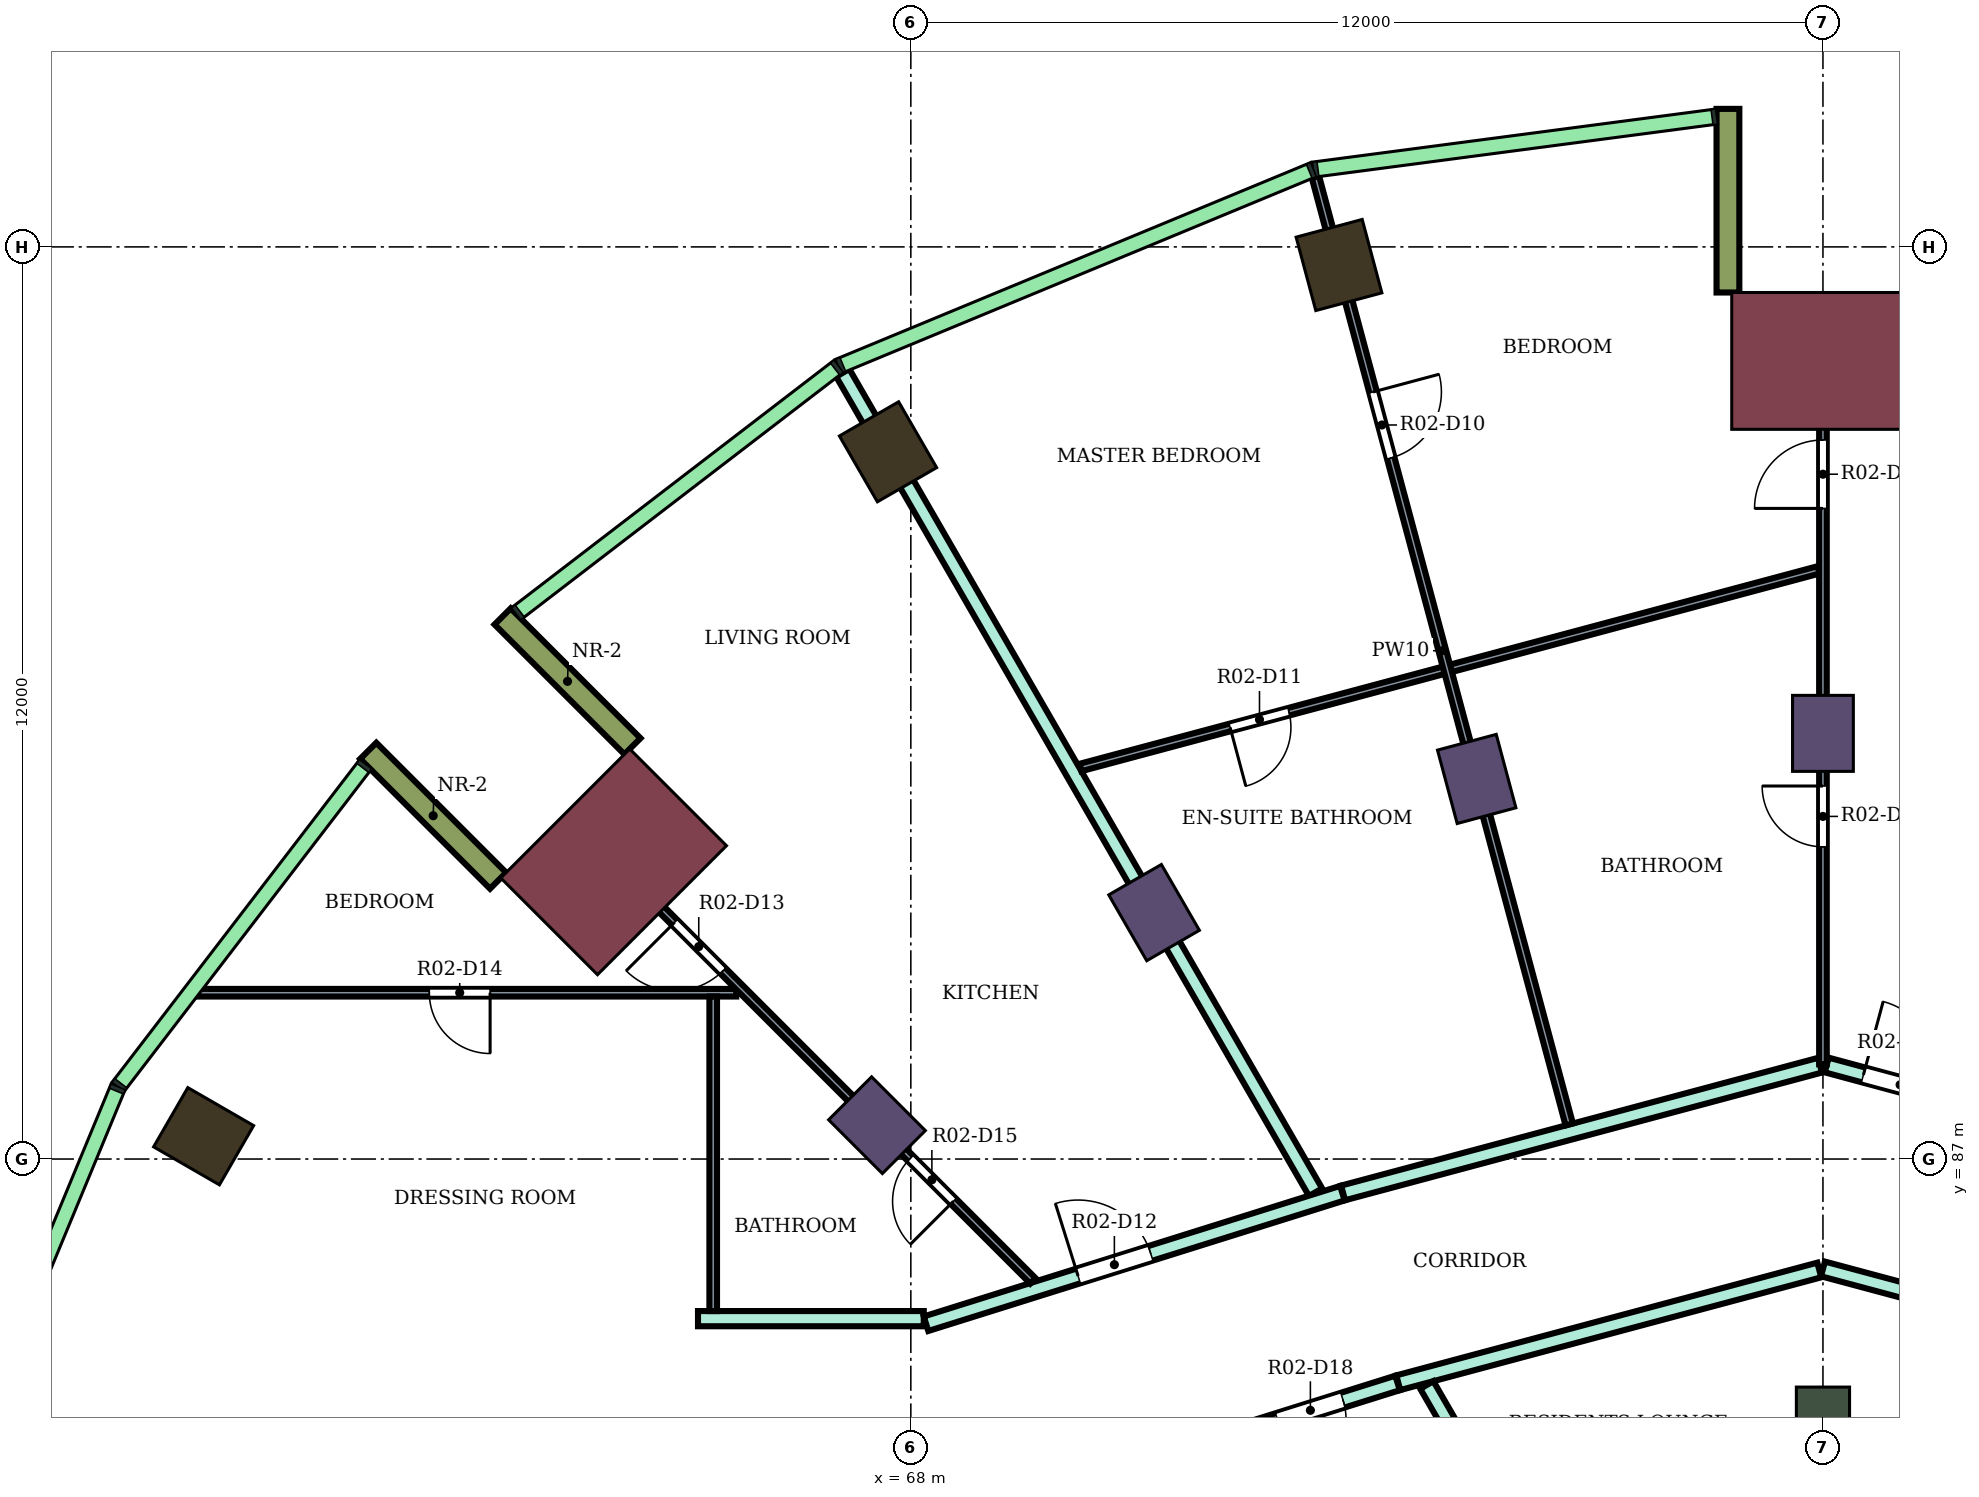
"""IFC4 building model, lengths in metres.
Left out: names, types, materials, properties, quantities, classifications, styles, units other than length and angle.
Written with IfcOpenShell. Run it as: python <this file> out.ifc"""

import sys

from ifc_helpers import new_model, si_unit, direction, frame, frame_2d, origin, origin_2d, place, context, subcontext, project, spatial, rectangle, extrude, element, fill, save


model = new_model("IFC4")
c1 = context("Model", 3, precision=1e-05, world=origin(), true_north=direction((0.0, 1.0)))
c2 = subcontext(c1, "Body", "Model", "MODEL_VIEW")
j1 = project(units=[si_unit("LENGTHUNIT", "METRE"), si_unit("PLANEANGLEUNIT", "RADIAN")], contexts=[c1])
p1 = place(None, origin())
s1 = spatial("IfcSite", under=j1, at=p1, CompositionType="ELEMENT")
p2 = place(p1, origin())
s2 = spatial("IfcBuilding", under=s1, at=p2, CompositionType="ELEMENT")
p3 = place(p2, frame((0.0, 0.0, 178.2)))
s3 = spatial("IfcBuildingStorey", under=s2, at=p3, CompositionType="ELEMENT", Elevation=178.2)
for number, where, z_axis, x_axis in (
    (1, (73.633, 98.762, 0.0), (0.0, 0.0, 1.0), (-0.259, 0.966, 0.0)),
    (2, (67.7, 96.304, 0.0), (0.0, 0.0, 1.0), (-0.5, 0.866, 0.0)),
    (3, (58.696, 87.3, 0.0), (0.0, 0.0, 1.0), (-0.866, 0.5, 0.0)),
):
    element("IfcColumn", number, at=place(p3, frame(where, z_axis=z_axis, x_axis=x_axis)), inside=s3, PredefinedType="COLUMN", context=c2, shape_type="SweptSolid", body=[
        extrude(rectangle(XDim=1.0, YDim=0.9, at=origin_2d()), origin(), (0.0, 0.0, 1.0), 4.1),
    ])
for number, where, z_axis, x_axis in (
    (4, (80.0, 92.6, 0.0), (0.0, 0.0, 1.0), (0.0, 1.0, 0.0)),
    (5, (75.445, 92.0, 0.0), (0.0, 0.0, 1.0), (-0.259, 0.966, 0.0)),
    (6, (71.2, 90.242, 0.0), (0.0, 0.0, 1.0), (-0.5, 0.866, 0.0)),
    (7, (67.555, 87.445, 0.0), (0.0, 0.0, 1.0), (-0.707, 0.707, 0.0)),
):
    element("IfcColumn", number, at=place(p3, frame(where, z_axis=z_axis, x_axis=x_axis)), inside=s3, PredefinedType="COLUMN", context=c2, shape_type="SweptSolid", body=[
        extrude(rectangle(XDim=1.0, YDim=0.8, at=origin_2d()), origin(), (0.0, 0.0, 1.0), 4.1),
    ])
p4 = place(p3, frame((80.0, 83.6, 0.0), z_axis=(0.0, 0.0, 1.0), x_axis=(0.0, 1.0, 0.0)))
e8 = element("IfcColumn", 8, at=p4, inside=s3, PredefinedType="COLUMN", context=c2, shape_type="SweptSolid", body=[
    extrude(rectangle(XDim=0.8, YDim=0.7, at=origin_2d()), origin(), (0.0, 0.0, 1.0), 4.1),
])
for number, where, z_axis, x_axis in (
    (9, (80.0, 97.5, 0.0), (0.0, 0.0, 1.0), (0.0, 1.0, 0.0)),
    (10, (64.09, 90.91, 0.0), (0.0, 0.0, 1.0), (-0.707, 0.707, 0.0)),
):
    element("IfcColumn", number, at=place(p3, frame(where, z_axis=z_axis, x_axis=x_axis)), inside=s3, PredefinedType="COLUMN", context=c2, shape_type="SweptSolid", body=[
        extrude(rectangle(XDim=1.8, YDim=2.4, at=origin_2d()), origin(), (0.0, 0.0, 1.0), 4.1),
    ])
for number, where, z_axis, x_axis in (
    (11, (78.75, 98.4, 0.0), (0.0, 0.0, 1.0), (0.0, 1.0, 0.0)),
    (12, (64.338, 92.43, 0.0), (0.0, 0.0, 1.0), (-0.707, 0.707, 0.0)),
    (13, (62.57, 90.662, 0.0), (0.0, 0.0, 1.0), (-0.707, 0.707, 0.0)),
):
    element("IfcWall", number, at=place(p3, frame(where, z_axis=z_axis, x_axis=x_axis)), inside=s3, PredefinedType="NOTDEFINED", context=c2, shape_type="SweptSolid", body=[
        extrude(rectangle(XDim=2.416, YDim=0.3, at=frame_2d((1.208, 0.0))), origin(), (0.0, 0.0, 1.0), 4.1),
    ])
p5 = place(p3, frame((65.2, 84.9, 0.0), z_axis=(0.0, 0.0, 1.0), x_axis=(1.0, 0.0, 0.0)))
e14 = element("IfcWall", 14, at=p5, inside=s3, PredefinedType="PARTITIONING", context=c2, shape_type="SweptSolid", body=[
    extrude(rectangle(XDim=2.97, YDim=0.2, at=frame_2d((1.485, 0.0))), origin(), (0.0, 0.0, 1.0), 3.65),
])
p6 = place(p3, frame((67.104, 97.343, 0.0), z_axis=(0.0, 0.0, 1.0), x_axis=(0.499841888023, -0.866116670534, 0.0)))
e15 = element("IfcWall", 15, at=p6, inside=s3, PredefinedType="PARTITIONING", context=c2, shape_type="SweptSolid", body=[
    extrude(rectangle(XDim=12.446, YDim=0.2, at=frame_2d((6.223, 0.0))), origin(), (0.0, 0.0, 1.0), 3.65),
])
p7 = place(p3, frame((68.2, 84.833, 0.0), z_axis=(0.0, 0.0, 1.0), x_axis=(0.954191968402, 0.299195065863, 0.0)))
e16 = element("IfcWall", 16, at=p7, inside=s3, PredefinedType="PARTITIONING", context=c2, shape_type="SweptSolid", body=[
    extrude(rectangle(XDim=5.74, YDim=0.2, at=frame_2d((2.87, 0.0))), origin(), (0.0, 0.0, 1.0), 3.65),
])
p8 = place(p7, frame((2.097, 0.0, 0.0)))
e17 = element("IfcOpeningElement", 17, at=p8, cuts=e16, PredefinedType="OPENING", context=c2, shape_type="SweptSolid", body=[
    extrude(rectangle(XDim=1.0, YDim=2.1, at=frame_2d((0.5, 1.05))), frame((0.0, 0.11, 0.0), z_axis=(0.0, -1.0, 0.0), x_axis=(1.0, 0.0, 0.0)), (0.0, 0.0, 1.0), 0.22),
])
p9 = place(p3, frame((72.1, 83.332, 0.0), z_axis=(0.0, 0.0, 1.0), x_axis=(0.954233106619, 0.299063836383, 0.0)))
e18 = element("IfcWall", 18, at=p9, inside=s3, PredefinedType="PARTITIONING", context=c2, shape_type="SweptSolid", body=[
    extrude(rectangle(XDim=2.414, YDim=0.2, at=frame_2d((1.207, 0.0))), origin(), (0.0, 0.0, 1.0), 3.65),
])
p10 = place(p9, frame((0.762, 0.0, 0.0)))
e19 = element("IfcOpeningElement", 19, at=p10, cuts=e18, PredefinedType="OPENING", context=c2, shape_type="SweptSolid", body=[
    extrude(rectangle(XDim=0.9, YDim=2.1, at=frame_2d((0.45, 1.05))), frame((0.0, 0.11, 0.0), z_axis=(0.0, -1.0, 0.0), x_axis=(1.0, 0.0, 0.0)), (0.0, 0.0, 1.0), 0.22),
])
p11 = place(p3, frame((73.687, 86.554, 0.0), z_axis=(0.0, 0.0, 1.0), x_axis=(0.96595928904, 0.258694128106, 0.0)))
e20 = element("IfcWall", 20, at=p11, inside=s3, PredefinedType="PARTITIONING", context=c2, shape_type="SweptSolid", body=[
    extrude(rectangle(XDim=6.496, YDim=0.2, at=frame_2d((3.248, 0.0))), origin(), (0.0, 0.0, 1.0), 3.65),
])
p12 = place(p3, frame((74.413, 84.057, 0.0), z_axis=(0.0, 0.0, 1.0), x_axis=(0.965970849692, 0.258650956976, 0.0)))
e21 = element("IfcWall", 21, at=p12, inside=s3, PredefinedType="PARTITIONING", context=c2, shape_type="SweptSolid", body=[
    extrude(rectangle(XDim=5.734, YDim=0.2, at=frame_2d((2.867, 0.0))), origin(), (0.0, 0.0, 1.0), 3.65),
])
p13 = place(p3, frame((74.788, 84.028, 0.0), z_axis=(0.0, 0.0, 1.0), x_axis=(0.499859501914, -0.866106505198, 0.0)))
e22 = element("IfcWall", 22, at=p13, inside=s3, PredefinedType="PARTITIONING", context=c2, shape_type="SweptSolid", body=[
    extrude(rectangle(XDim=2.724, YDim=0.2, at=frame_2d((1.362, 0.0))), origin(), (0.0, 0.0, 1.0), 3.65),
])
p14 = place(p3, frame((80.0, 85.554, 0.0), z_axis=(0.0, 0.0, 1.0), x_axis=(0.965894438951, -0.258936155845, 0.0)))
e23 = element("IfcWall", 23, at=p14, inside=s3, PredefinedType="PARTITIONING", context=c2, shape_type="SweptSolid", body=[
    extrude(rectangle(XDim=5.774, YDim=0.2, at=frame_2d((2.887, 0.0))), origin(), (0.0, 0.0, 1.0), 3.65),
])
p15 = place(p14, frame((1.841, 0.0, 0.0)))
e24 = element("IfcOpeningElement", 24, at=p15, cuts=e23, PredefinedType="OPENING", context=c2, shape_type="SweptSolid", body=[
    extrude(rectangle(XDim=1.8, YDim=2.1, at=frame_2d((0.9, 1.05))), frame((0.0, 0.11, 0.0), z_axis=(0.0, -1.0, 0.0), x_axis=(1.0, 0.0, 0.0)), (0.0, 0.0, 1.0), 0.22),
])
p16 = place(p3, frame((80.049, 88.237, 0.0), z_axis=(0.0, 0.0, 1.0), x_axis=(0.965582990495, -0.260095152718, 0.0)))
e25 = element("IfcWall", 25, at=p16, inside=s3, PredefinedType="PARTITIONING", context=c2, shape_type="SweptSolid", body=[
    extrude(rectangle(XDim=6.476, YDim=0.2, at=frame_2d((3.238, 0.0))), origin(), (0.0, 0.0, 1.0), 3.65),
])
p17 = place(p16, frame((0.5, 0.0, 0.0)))
e26 = element("IfcOpeningElement", 26, at=p17, cuts=e25, PredefinedType="OPENING", context=c2, shape_type="SweptSolid", body=[
    extrude(rectangle(XDim=1.0, YDim=2.1, at=frame_2d((0.5, 1.05))), frame((0.0, 0.11, 0.0), z_axis=(0.0, -1.0, 0.0), x_axis=(1.0, 0.0, 0.0)), (0.0, 0.0, 1.0), 0.22),
])
p18 = place(p3, frame((58.6, 89.188, 0.0), z_axis=(0.0, 0.0, 1.0), x_axis=(1.0, 0.0, 0.0)))
e27 = element("IfcWall", 27, at=p18, inside=s3, PredefinedType="PARTITIONING", context=c2, shape_type="SweptSolid", body=[
    extrude(rectangle(XDim=7.103, YDim=0.1, at=frame_2d((3.551, 0.0))), origin(), (0.0, 0.0, 1.0), 3.65),
])
p19 = place(p18, frame((3.065, 0.0, 0.0)))
e28 = element("IfcOpeningElement", 28, at=p19, cuts=e27, PredefinedType="OPENING", context=c2, shape_type="SweptSolid", body=[
    extrude(rectangle(XDim=0.8, YDim=2.1, at=frame_2d((0.4, 1.05))), frame((0.0, 0.06, 0.0), z_axis=(0.0, -1.0, 0.0), x_axis=(1.0, 0.0, 0.0)), (0.0, 0.0, 1.0), 0.12),
])
p20 = place(p3, frame((63.598, 91.407, 0.0), z_axis=(0.0, 0.0, 1.0), x_axis=(0.70700623685, -0.707207311228, 0.0)))
e29 = element("IfcWall", 29, at=p20, inside=s3, PredefinedType="PARTITIONING", context=c2, shape_type="SweptSolid", body=[
    extrude(rectangle(XDim=8.499, YDim=0.1, at=frame_2d((4.25, 0.0))), origin(), (0.0, 0.0, 1.0), 3.65),
])
p21 = place(p20, frame((1.83, 0.0, 0.0)))
e30 = element("IfcOpeningElement", 30, at=p21, cuts=e29, PredefinedType="OPENING", context=c2, shape_type="SweptSolid", body=[
    extrude(rectangle(XDim=0.9, YDim=2.1, at=frame_2d((0.45, 1.05))), frame((0.0, 0.06, 0.0), z_axis=(0.0, -1.0, 0.0), x_axis=(1.0, 0.0, 0.0)), (0.0, 0.0, 1.0), 0.12),
])
p22 = place(p20, frame((6.219, 0.0, 0.0)))
e31 = element("IfcOpeningElement", 31, at=p22, cuts=e29, PredefinedType="OPENING", context=c2, shape_type="SweptSolid", body=[
    extrude(rectangle(XDim=0.8, YDim=2.1, at=frame_2d((0.4, 1.05))), frame((0.0, 0.06, 0.0), z_axis=(0.0, -1.0, 0.0), x_axis=(1.0, 0.0, 0.0)), (0.0, 0.0, 1.0), 0.12),
])
p23 = place(p3, frame((65.4, 85.0, 0.0), z_axis=(0.0, 0.0, 1.0), x_axis=(0.0, 1.0, 0.0)))
e32 = element("IfcWall", 32, at=p23, inside=s3, PredefinedType="PARTITIONING", context=c2, shape_type="SweptSolid", body=[
    extrude(rectangle(XDim=4.138, YDim=0.1, at=frame_2d((2.069, 0.0))), origin(), (0.0, 0.0, 1.0), 3.65),
])
p24 = place(p3, frame((70.232, 92.151, 0.0), z_axis=(0.0, 0.0, 1.0), x_axis=(0.965980126086, 0.258616310405, 0.0)))
e33 = element("IfcWall", 33, at=p24, inside=s3, PredefinedType="PARTITIONING", context=c2, shape_type="SweptSolid", body=[
    extrude(rectangle(XDim=10.053, YDim=0.1, at=frame_2d((5.026, 0.0))), origin(), (0.0, 0.0, 1.0), 3.65),
])
p25 = place(p24, frame((2.038, 0.0, 0.0)))
e34 = element("IfcOpeningElement", 34, at=p25, cuts=e33, PredefinedType="OPENING", context=c2, shape_type="SweptSolid", body=[
    extrude(rectangle(XDim=0.8, YDim=2.1, at=frame_2d((0.4, 1.05))), frame((0.0, 0.06, 0.0), z_axis=(0.0, -1.0, 0.0), x_axis=(1.0, 0.0, 0.0)), (0.0, 0.0, 1.0), 0.12),
])
p26 = place(p3, frame((73.323, 99.919, 0.0), z_axis=(0.0, 0.0, 1.0), x_axis=(0.258768239436, -0.965939438194, 0.0)))
e35 = element("IfcWall", 35, at=p26, inside=s3, PredefinedType="PARTITIONING", context=c2, shape_type="SweptSolid", body=[
    extrude(rectangle(XDim=12.904, YDim=0.1, at=frame_2d((6.452, 0.0))), origin(), (0.0, 0.0, 1.0), 3.65),
])
p27 = place(p26, frame((2.927, 0.0, 0.0)))
e36 = element("IfcOpeningElement", 36, at=p27, cuts=e35, PredefinedType="OPENING", context=c2, shape_type="SweptSolid", body=[
    extrude(rectangle(XDim=0.9, YDim=2.1, at=frame_2d((0.45, 1.05))), frame((0.0, 0.06, 0.0), z_axis=(0.0, -1.0, 0.0), x_axis=(1.0, 0.0, 0.0)), (0.0, 0.0, 1.0), 0.12),
])
p28 = place(p3, frame((80.0, 88.246, 0.0), z_axis=(0.0, 0.0, 1.0), x_axis=(0.0, 1.0, 0.0)))
e37 = element("IfcWall", 37, at=p28, inside=s3, PredefinedType="PARTITIONING", context=c2, shape_type="SweptSolid", body=[
    extrude(rectangle(XDim=9.954, YDim=0.1, at=frame_2d((4.977, 0.0))), origin(), (0.0, 0.0, 1.0), 3.65),
])
p29 = place(p28, frame((7.313, 0.0, 0.0)))
e38 = element("IfcOpeningElement", 38, at=p29, cuts=e37, PredefinedType="OPENING", context=c2, shape_type="SweptSolid", body=[
    extrude(rectangle(XDim=0.9, YDim=2.1, at=frame_2d((0.45, 1.05))), frame((0.0, 0.06, 0.0), z_axis=(0.0, -1.0, 0.0), x_axis=(1.0, 0.0, 0.0)), (0.0, 0.0, 1.0), 0.12),
])
p30 = place(p28, frame((2.862, 0.0, 0.0)))
e39 = element("IfcOpeningElement", 39, at=p30, cuts=e37, PredefinedType="OPENING", context=c2, shape_type="SweptSolid", body=[
    extrude(rectangle(XDim=0.8, YDim=2.1, at=frame_2d((0.4, 1.05))), frame((0.0, 0.06, 0.0), z_axis=(0.0, -1.0, 0.0), x_axis=(1.0, 0.0, 0.0)), (0.0, 0.0, 1.0), 0.12),
])
p31 = place(p17, origin())
e40 = element("IfcDoor", 40, at=p31, inside=s3, OperationType="SINGLE_SWING_LEFT", PredefinedType="DOOR", context=c2, shape_type="SweptSolid", body=[
    extrude(rectangle(XDim=1.0, YDim=2.1, at=frame_2d((0.5, 1.05))), frame((0.0, 0.025, 0.0), z_axis=(0.0, -1.0, 0.0), x_axis=(1.0, 0.0, 0.0)), (0.0, 0.0, 1.0), 0.05),
])
fill(e26, e40)
p32 = place(p29, origin())
e41 = element("IfcDoor", 41, at=p32, inside=s3, OperationType="SINGLE_SWING_LEFT", PredefinedType="DOOR", context=c2, shape_type="SweptSolid", body=[
    extrude(rectangle(XDim=0.9, YDim=2.1, at=frame_2d((0.45, 1.05))), frame((0.0, 0.025, 0.0), z_axis=(0.0, -1.0, 0.0), x_axis=(1.0, 0.0, 0.0)), (0.0, 0.0, 1.0), 0.05),
])
fill(e38, e41)
p33 = place(p30, origin())
e42 = element("IfcDoor", 42, at=p33, inside=s3, OperationType="SINGLE_SWING_RIGHT", PredefinedType="DOOR", context=c2, shape_type="SweptSolid", body=[
    extrude(rectangle(XDim=0.8, YDim=2.1, at=frame_2d((0.4, 1.05))), frame((0.0, 0.025, 0.0), z_axis=(0.0, -1.0, 0.0), x_axis=(1.0, 0.0, 0.0)), (0.0, 0.0, 1.0), 0.05),
])
fill(e39, e42)
p34 = place(p27, origin())
e43 = element("IfcDoor", 43, at=p34, inside=s3, OperationType="SINGLE_SWING_LEFT", PredefinedType="DOOR", context=c2, shape_type="SweptSolid", body=[
    extrude(rectangle(XDim=0.9, YDim=2.1, at=frame_2d((0.45, 1.05))), frame((0.0, 0.025, 0.0), z_axis=(0.0, -1.0, 0.0), x_axis=(1.0, 0.0, 0.0)), (0.0, 0.0, 1.0), 0.05),
])
fill(e36, e43)
p35 = place(p25, frame((0.8, 0.0, 0.0), z_axis=(0.0, 0.0, 1.0), x_axis=(-1.0, 0.0, 0.0)))
e44 = element("IfcDoor", 44, at=p35, inside=s3, OperationType="SINGLE_SWING_RIGHT", PredefinedType="DOOR", context=c2, shape_type="SweptSolid", body=[
    extrude(rectangle(XDim=0.8, YDim=2.1, at=frame_2d((0.4, 1.05))), frame((0.0, 0.025, 0.0), z_axis=(0.0, -1.0, 0.0), x_axis=(1.0, 0.0, 0.0)), (0.0, 0.0, 1.0), 0.05),
])
fill(e34, e44)
p36 = place(p8, origin())
e45 = element("IfcDoor", 45, at=p36, inside=s3, OperationType="SINGLE_SWING_LEFT", PredefinedType="DOOR", context=c2, shape_type="SweptSolid", body=[
    extrude(rectangle(XDim=1.0, YDim=2.1, at=frame_2d((0.5, 1.05))), frame((0.0, 0.025, 0.0), z_axis=(0.0, -1.0, 0.0), x_axis=(1.0, 0.0, 0.0)), (0.0, 0.0, 1.0), 0.05),
])
fill(e17, e45)
p37 = place(p21, frame((0.9, 0.0, 0.0), z_axis=(0.0, 0.0, 1.0), x_axis=(-1.0, 0.0, 0.0)))
e46 = element("IfcDoor", 46, at=p37, inside=s3, OperationType="SINGLE_SWING_RIGHT", PredefinedType="DOOR", context=c2, shape_type="SweptSolid", body=[
    extrude(rectangle(XDim=0.9, YDim=2.1, at=frame_2d((0.45, 1.05))), frame((0.0, 0.025, 0.0), z_axis=(0.0, -1.0, 0.0), x_axis=(1.0, 0.0, 0.0)), (0.0, 0.0, 1.0), 0.05),
])
fill(e30, e46)
p38 = place(p19, frame((0.8, 0.0, 0.0), z_axis=(0.0, 0.0, 1.0), x_axis=(-1.0, 0.0, 0.0)))
e47 = element("IfcDoor", 47, at=p38, inside=s3, OperationType="SINGLE_SWING_LEFT", PredefinedType="DOOR", context=c2, shape_type="SweptSolid", body=[
    extrude(rectangle(XDim=0.8, YDim=2.1, at=frame_2d((0.4, 1.05))), frame((0.0, 0.025, 0.0), z_axis=(0.0, -1.0, 0.0), x_axis=(1.0, 0.0, 0.0)), (0.0, 0.0, 1.0), 0.05),
])
fill(e28, e47)
p39 = place(p22, frame((0.8, 0.0, 0.0), z_axis=(0.0, 0.0, 1.0), x_axis=(-1.0, 0.0, 0.0)))
e48 = element("IfcDoor", 48, at=p39, inside=s3, OperationType="SINGLE_SWING_LEFT", PredefinedType="DOOR", context=c2, shape_type="SweptSolid", body=[
    extrude(rectangle(XDim=0.8, YDim=2.1, at=frame_2d((0.4, 1.05))), frame((0.0, 0.025, 0.0), z_axis=(0.0, -1.0, 0.0), x_axis=(1.0, 0.0, 0.0)), (0.0, 0.0, 1.0), 0.05),
])
fill(e31, e48)
p40 = place(p10, frame((0.9, 0.0, 0.0), z_axis=(0.0, 0.0, 1.0), x_axis=(-1.0, 0.0, 0.0)))
e49 = element("IfcDoor", 49, at=p40, inside=s3, OperationType="SINGLE_SWING_RIGHT", PredefinedType="DOOR", context=c2, shape_type="SweptSolid", body=[
    extrude(rectangle(XDim=0.9, YDim=2.1, at=frame_2d((0.45, 1.05))), frame((0.0, 0.025, 0.0), z_axis=(0.0, -1.0, 0.0), x_axis=(1.0, 0.0, 0.0)), (0.0, 0.0, 1.0), 0.05),
])
fill(e19, e49)
save(model, sys.argv[1])
